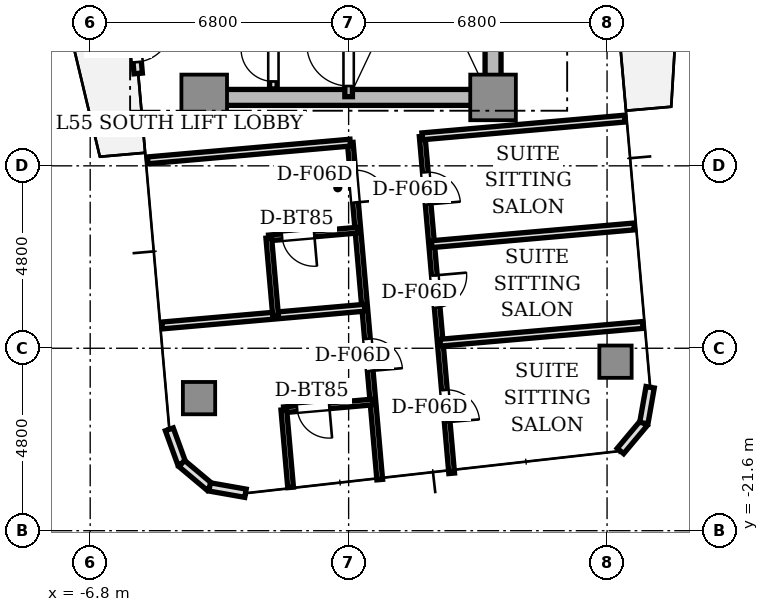
"""IFC4 building model, lengths in metres.
Left out: names, types, materials, properties, quantities, classifications, styles, units other than length and angle.
Written with IfcOpenShell. Run it as: python <this file> out.ifc"""

import sys

from ifc_helpers import new_model, si_unit, direction, frame, frame_2d, origin, origin_2d, place, context, subcontext, project, spatial, rectangle, extrude, source, transform, mapped, element, fill, save


model = new_model("IFC4")
c1 = context("Model", 3, precision=1e-05, world=origin(), true_north=direction((0.0, 1.0)))
c2 = subcontext(c1, "Body", "Model", "MODEL_VIEW")
j1 = project(units=[si_unit("LENGTHUNIT", "METRE"), si_unit("PLANEANGLEUNIT", "RADIAN")], contexts=[c1])
p1 = place(None, origin())
s1 = spatial("IfcSite", under=j1, at=p1, CompositionType="ELEMENT")
p2 = place(p1, origin())
s2 = spatial("IfcBuilding", under=s1, at=p2, CompositionType="ELEMENT")
p3 = place(p2, frame((0.0, 0.0, 198.65)))
s3 = spatial("IfcBuildingStorey", under=s2, at=p3, CompositionType="ELEMENT", Elevation=198.65)
p4 = place(p3, frame((-3.55, -10.2, 0.0), z_axis=(0.0, 0.0, 1.0), x_axis=(1.0, 0.0, 0.0)))
e1 = element("IfcWall", 1, at=p4, inside=s3, PredefinedType="SHEAR", context=c2, shape_type="SweptSolid", body=[
    extrude(rectangle(XDim=7.1, YDim=0.42, at=frame_2d((3.55, 0.0))), origin(), (0.0, 0.0, 1.0), 3.03),
])
p5 = place(p3, frame((3.8, -9.75, 0.0), z_axis=(0.0, 0.0, 1.0), x_axis=(0.0, 1.0, 0.0)))
e2 = element("IfcWall", 2, at=p5, inside=s3, PredefinedType="SHEAR", context=c2, shape_type="SweptSolid", body=[
    extrude(rectangle(XDim=6.9, YDim=0.42, at=frame_2d((3.45, 0.0))), origin(), (0.0, 0.0, 1.0), 3.03),
])
m1 = source(origin(), c2, "Body", "SweptSolid", [
    extrude(rectangle(XDim=1.2, YDim=1.2, at=origin_2d()), origin(), (0.0, 0.0, 1.0), 3.03),
])
for number, where, z_axis, x_axis in (
    (3, (-3.8, -10.2, 0.0), (0.0, 0.0, 1.0), (1.0, 0.0, 0.0)),
    (4, (3.8, -10.2, 0.0), (0.0, 0.0, 1.0), (1.0, 0.0, 0.0)),
):
    element("IfcColumn", number, at=place(p3, frame(where, z_axis=z_axis, x_axis=x_axis)), inside=s3, PredefinedType="COLUMN", context=c2, shape_type="MappedRepresentation", body=[
        mapped(m1, transform((0.0, 0.0, 0.0), scale=1.0)),
    ])
m2 = source(origin(), c2, "Body", "SweptSolid", [
    extrude(rectangle(XDim=0.85, YDim=0.85, at=origin_2d()), origin(), (0.0, 0.0, 1.0), 3.03),
])
for number, where, z_axis, x_axis in (
    (5, (-3.936, -18.112, 0.0), (0.0, 0.0, 1.0), (1.0, 0.0, 0.0)),
    (6, (7.022, -17.153, 0.0), (0.0, 0.0, 1.0), (1.0, 0.0, 0.0)),
):
    element("IfcColumn", number, at=place(p3, frame(where, z_axis=z_axis, x_axis=x_axis)), inside=s3, PredefinedType="COLUMN", context=c2, shape_type="MappedRepresentation", body=[
        mapped(m2, transform((0.0, 0.0, 0.0), scale=1.0)),
    ])
p6 = place(p3, frame((-5.772, -6.879, 0.0), z_axis=(0.0, 0.0, 1.0), x_axis=(0.087168071984, -0.996193619346, 0.0)))
e7 = element("IfcWall", 7, at=p6, inside=s3, PredefinedType="STANDARD", context=c2, shape_type="SweptSolid", body=[
    extrude(rectangle(XDim=2.7, YDim=0.22, at=frame_2d((1.35, 0.0))), origin(), (0.0, 0.0, 1.0), 3.03),
])
p7 = place(p6, frame((1.4, 0.0, 0.0)))
e8 = element("IfcOpeningElement", 8, at=p7, cuts=e7, PredefinedType="OPENING", context=c2, shape_type="SweptSolid", body=[
    extrude(rectangle(XDim=1.0, YDim=2.2, at=frame_2d((0.5, 1.1))), frame((0.0, 0.12, 0.0), z_axis=(0.0, -1.0, 0.0), x_axis=(1.0, 0.0, 0.0)), (0.0, 0.0, 1.0), 0.24),
])
p8 = place(p3, frame((-4.718, -18.933, 0.0), z_axis=(0.0, 0.0, 1.0), x_axis=(0.34188635151, -0.939741306239, 0.0)))
e9 = element("IfcWall", 9, at=p8, inside=s3, PredefinedType="STANDARD", context=c2, shape_type="SweptSolid", body=[
    extrude(rectangle(XDim=0.958, YDim=0.22, at=frame_2d((0.479, 0.0))), origin(), (0.0, 0.0, 1.0), 3.03),
])
for number, where, z_axis, x_axis in (
    (10, (-4.39, -19.833, 0.0), (0.0, 0.0, 1.0), (0.766, -0.643, 0.0)),
    (11, (-3.657, -20.449, 0.0), (0.0, 0.0, 1.0), (0.985, -0.174, 0.0)),
):
    element("IfcWall", number, at=place(p3, frame(where, z_axis=z_axis, x_axis=x_axis)), inside=s3, PredefinedType="STANDARD", context=c2, shape_type="SweptSolid", body=[
        extrude(rectangle(XDim=0.958, YDim=0.22, at=frame_2d((0.479, 0.0))), origin(), (0.0, 0.0, 1.0), 3.03),
    ])
for number, where, z_axis, x_axis in (
    (12, (7.152, -19.503, 0.0), (0.0, 0.0, 1.0), (0.643, 0.766, 0.0)),
    (13, (7.768, -18.769, 0.0), (0.0, 0.0, 1.0), (0.174, 0.985, 0.0)),
):
    element("IfcWall", number, at=place(p3, frame(where, z_axis=z_axis, x_axis=x_axis)), inside=s3, PredefinedType="STANDARD", context=c2, shape_type="SweptSolid", body=[
        extrude(rectangle(XDim=0.958, YDim=0.22, at=frame_2d((0.479, 0.0))), origin(), (0.0, 0.0, 1.0), 3.03),
    ])
p9 = place(p3, frame((0.0, -10.18, 0.0), z_axis=(0.0, 0.0, 1.0), x_axis=(0.0, 1.0, 0.0)))
e14 = element("IfcWall", 14, at=p9, inside=s3, PredefinedType="SOLIDWALL", context=c2, shape_type="SweptSolid", body=[
    extrude(rectangle(XDim=7.68, YDim=0.2, at=frame_2d((3.84, 0.0))), origin(), (0.0, 0.0, 1.0), 3.03),
])
p10 = place(p9, frame((0.28, 0.0, 0.0)))
e15 = element("IfcOpeningElement", 15, at=p10, cuts=e14, PredefinedType="OPENING", context=c2, shape_type="SweptSolid", body=[
    extrude(rectangle(XDim=1.1, YDim=2.15, at=frame_2d((0.55, 1.075))), frame((0.0, 0.11, 0.0), z_axis=(0.0, -1.0, 0.0), x_axis=(1.0, 0.0, 0.0)), (0.0, 0.0, 1.0), 0.22),
])
p11 = place(p3, frame((-1.98, -9.98, 0.0), z_axis=(0.0, 0.0, 1.0), x_axis=(0.0, 1.0, 0.0)))
e16 = element("IfcWall", 16, at=p11, inside=s3, PredefinedType="SOLIDWALL", context=c2, shape_type="SweptSolid", body=[
    extrude(rectangle(XDim=4.66, YDim=0.2, at=frame_2d((2.33, 0.0))), origin(), (0.0, 0.0, 1.0), 2.58),
])
p12 = place(p11, frame((0.2, 0.0, 0.0)))
e17 = element("IfcOpeningElement", 17, at=p12, cuts=e16, PredefinedType="OPENING", context=c2, shape_type="SweptSolid", body=[
    extrude(rectangle(XDim=0.85, YDim=2.1, at=frame_2d((0.425, 1.05))), frame((0.0, 0.11, 0.0), z_axis=(0.0, -1.0, 0.0), x_axis=(1.0, 0.0, 0.0)), (0.0, 0.0, 1.0), 0.22),
])
p13 = place(p3, frame((1.936, -11.224, 0.0), z_axis=(0.0, 0.0, 1.0), x_axis=(0.087151636982, -0.996195057291, 0.0)))
e18 = element("IfcWall", 18, at=p13, inside=s3, PredefinedType="PARTITIONING", context=c2, shape_type="SweptSolid", body=[
    extrude(rectangle(XDim=8.9, YDim=0.15, at=frame_2d((4.45, 0.0))), origin(), (0.0, 0.0, 1.0), 2.58),
])
p14 = place(p13, frame((0.949, 0.0, 0.0)))
e19 = element("IfcOpeningElement", 19, at=p14, cuts=e18, PredefinedType="OPENING", context=c2, shape_type="SweptSolid", body=[
    extrude(rectangle(XDim=0.85, YDim=2.1, at=frame_2d((0.425, 1.05))), frame((0.0, 0.085, 0.0), z_axis=(0.0, -1.0, 0.0), x_axis=(1.0, 0.0, 0.0)), (0.0, 0.0, 1.0), 0.17),
])
p15 = place(p13, frame((3.674, 0.0, 0.0)))
e20 = element("IfcOpeningElement", 20, at=p15, cuts=e18, PredefinedType="OPENING", context=c2, shape_type="SweptSolid", body=[
    extrude(rectangle(XDim=0.85, YDim=2.1, at=frame_2d((0.425, 1.05))), frame((0.0, 0.085, 0.0), z_axis=(0.0, -1.0, 0.0), x_axis=(1.0, 0.0, 0.0)), (0.0, 0.0, 1.0), 0.17),
])
p16 = place(p13, frame((6.7, 0.0, 0.0)))
e21 = element("IfcOpeningElement", 21, at=p16, cuts=e18, PredefinedType="OPENING", context=c2, shape_type="SweptSolid", body=[
    extrude(rectangle(XDim=0.85, YDim=2.1, at=frame_2d((0.425, 1.05))), frame((0.0, 0.085, 0.0), z_axis=(0.0, -1.0, 0.0), x_axis=(1.0, 0.0, 0.0)), (0.0, 0.0, 1.0), 0.17),
])
p17 = place(p3, frame((0.043, -11.39, 0.0), z_axis=(0.0, 0.0, 1.0), x_axis=(0.087178860582, -0.996192675273, 0.0)))
e22 = element("IfcWall", 22, at=p17, inside=s3, PredefinedType="PARTITIONING", context=c2, shape_type="SweptSolid", body=[
    extrude(rectangle(XDim=8.9, YDim=0.15, at=frame_2d((4.45, 0.0))), origin(), (0.0, 0.0, 1.0), 2.58),
])
p18 = place(p17, frame((0.73, 0.0, 0.0)))
e23 = element("IfcOpeningElement", 23, at=p18, cuts=e22, PredefinedType="OPENING", context=c2, shape_type="SweptSolid", body=[
    extrude(rectangle(XDim=0.85, YDim=2.1, at=frame_2d((0.425, 1.05))), frame((0.0, 0.085, 0.0), z_axis=(0.0, -1.0, 0.0), x_axis=(1.0, 0.0, 0.0)), (0.0, 0.0, 1.0), 0.17),
])
p19 = place(p17, frame((5.181, 0.0, 0.0)))
e24 = element("IfcOpeningElement", 24, at=p19, cuts=e22, PredefinedType="OPENING", context=c2, shape_type="SweptSolid", body=[
    extrude(rectangle(XDim=0.85, YDim=2.1, at=frame_2d((0.425, 1.05))), frame((0.0, 0.085, 0.0), z_axis=(0.0, -1.0, 0.0), x_axis=(1.0, 0.0, 0.0)), (0.0, 0.0, 1.0), 0.17),
])
for number, where, z_axis, x_axis in (
    (25, (1.936, -11.224, 0.0), (0.0, 0.0, 1.0), (0.996, 0.087, 0.0)),
    (26, (-5.287, -11.856, 0.0), (0.0, 0.0, 1.0), (0.996, 0.087, 0.0)),
    (27, (2.184, -14.061, 0.0), (0.0, 0.0, 1.0), (0.996, 0.087, 0.0)),
    (28, (2.411, -16.653, 0.0), (0.0, 0.0, 1.0), (0.996, 0.087, 0.0)),
    (29, (0.423, -15.734, 0.0), (0.0, 0.0, 1.0), (-0.996, -0.087, 0.0)),
):
    element("IfcWall", number, at=place(p3, frame(where, z_axis=z_axis, x_axis=x_axis)), inside=s3, PredefinedType="PARTITIONING", context=c2, shape_type="SweptSolid", body=[
        extrude(rectangle(XDim=5.35, YDim=0.18, at=frame_2d((2.675, 0.0))), origin(), (0.0, 0.0, 1.0), 2.58),
    ])
p20 = place(p3, frame((0.244, -13.692, 0.0), z_axis=(0.0, 0.0, 1.0), x_axis=(-0.996197656711, -0.087121918963, 0.0)))
e30 = element("IfcWall", 30, at=p20, inside=s3, PredefinedType="PARTITIONING", context=c2, shape_type="SweptSolid", body=[
    extrude(rectangle(XDim=2.354, YDim=0.15, at=frame_2d((1.177, 0.0))), origin(), (0.0, 0.0, 1.0), 2.58),
])
p21 = place(p20, frame((1.154, 0.0, 0.0)))
e31 = element("IfcOpeningElement", 31, at=p21, cuts=e30, PredefinedType="OPENING", context=c2, shape_type="SweptSolid", body=[
    extrude(rectangle(XDim=0.85, YDim=2.1, at=frame_2d((0.425, 1.05))), frame((0.0, 0.085, 0.0), z_axis=(0.0, -1.0, 0.0), x_axis=(1.0, 0.0, 0.0)), (0.0, 0.0, 1.0), 0.17),
])
p22 = place(p3, frame((-2.101, -13.897, 0.0), z_axis=(0.0, 0.0, 1.0), x_axis=(0.087174336889, -0.99619307114, 0.0)))
e32 = element("IfcWall", 32, at=p22, inside=s3, PredefinedType="PARTITIONING", context=c2, shape_type="SweptSolid", body=[
    extrude(rectangle(XDim=2.05, YDim=0.15, at=frame_2d((1.025, 0.0))), origin(), (0.0, 0.0, 1.0), 2.58),
])
p23 = place(p3, frame((0.64, -18.213, 0.0), z_axis=(0.0, 0.0, 1.0), x_axis=(-0.996188649846, -0.087224846905, 0.0)))
e33 = element("IfcWall", 33, at=p23, inside=s3, PredefinedType="PARTITIONING", context=c2, shape_type="SweptSolid", body=[
    extrude(rectangle(XDim=2.354, YDim=0.15, at=frame_2d((1.177, 0.0))), origin(), (0.0, 0.0, 1.0), 2.58),
])
p24 = place(p23, frame((1.154, 0.0, 0.0)))
e34 = element("IfcOpeningElement", 34, at=p24, cuts=e33, PredefinedType="OPENING", context=c2, shape_type="SweptSolid", body=[
    extrude(rectangle(XDim=0.85, YDim=2.1, at=frame_2d((0.425, 1.05))), frame((0.0, 0.085, 0.0), z_axis=(0.0, -1.0, 0.0), x_axis=(1.0, 0.0, 0.0)), (0.0, 0.0, 1.0), 0.17),
])
p25 = place(p3, frame((-1.705, -18.419, 0.0), z_axis=(0.0, 0.0, 1.0), x_axis=(0.087056149438, -0.996203406361, 0.0)))
e35 = element("IfcWall", 35, at=p25, inside=s3, PredefinedType="PARTITIONING", context=c2, shape_type="SweptSolid", body=[
    extrude(rectangle(XDim=2.05, YDim=0.15, at=frame_2d((1.025, 0.0))), origin(), (0.0, 0.0, 1.0), 2.58),
])
m3 = source(origin(), c2, "Body", "SweptSolid", [
    extrude(rectangle(XDim=1.0, YDim=0.05, at=origin_2d()), origin(), (0.0, 0.0, 1.0), 2.2),
])
p26 = place(p7, frame((0.5, 0.0, 0.0)))
e36 = element("IfcDoor", 36, at=p26, inside=s3, OperationType="SINGLE_SWING_LEFT", PredefinedType="DOOR", context=c2, shape_type="MappedRepresentation", body=[
    mapped(m3, transform((0.0, 0.0, 0.0), scale=1.0)),
])
fill(e8, e36)
m4 = source(origin(), c2, "Body", "SweptSolid", [
    extrude(rectangle(XDim=1.1, YDim=0.05, at=origin_2d()), origin(), (0.0, 0.0, 1.0), 2.15),
])
p27 = place(p10, frame((0.55, 0.0, 0.0)))
e37 = element("IfcDoor", 37, at=p27, inside=s3, OperationType="SINGLE_SWING_RIGHT", PredefinedType="DOOR", context=c2, shape_type="MappedRepresentation", body=[
    mapped(m4, transform((0.0, 0.0, 0.0), scale=1.0)),
])
fill(e15, e37)
m5 = source(origin(), c2, "Body", "SweptSolid", [
    extrude(rectangle(XDim=0.85, YDim=0.05, at=origin_2d()), origin(), (0.0, 0.0, 1.0), 2.1),
])
p28 = place(p12, frame((0.425, 0.0, 0.0)))
e38 = element("IfcDoor", 38, at=p28, inside=s3, OperationType="SINGLE_SWING_RIGHT", PredefinedType="DOOR", context=c2, shape_type="MappedRepresentation", body=[
    mapped(m5, transform((0.0, 0.0, 0.0), scale=1.0)),
])
fill(e17, e38)
p29 = place(p14, frame((0.425, 0.0, 0.0)))
e39 = element("IfcDoor", 39, at=p29, inside=s3, OperationType="SINGLE_SWING_RIGHT", PredefinedType="DOOR", context=c2, shape_type="MappedRepresentation", body=[
    mapped(m5, transform((0.0, 0.0, 0.0), scale=1.0)),
])
fill(e19, e39)
p30 = place(p15, frame((0.425, 0.0, 0.0)))
e40 = element("IfcDoor", 40, at=p30, inside=s3, OperationType="SINGLE_SWING_LEFT", PredefinedType="DOOR", context=c2, shape_type="MappedRepresentation", body=[
    mapped(m5, transform((0.0, 0.0, 0.0), scale=1.0)),
])
fill(e20, e40)
p31 = place(p16, frame((0.425, 0.0, 0.0)))
e41 = element("IfcDoor", 41, at=p31, inside=s3, OperationType="SINGLE_SWING_RIGHT", PredefinedType="DOOR", context=c2, shape_type="MappedRepresentation", body=[
    mapped(m5, transform((0.0, 0.0, 0.0), scale=1.0)),
])
fill(e21, e41)
p32 = place(p21, frame((0.425, 0.0, 0.0)))
e42 = element("IfcDoor", 42, at=p32, inside=s3, OperationType="SINGLE_SWING_LEFT", PredefinedType="DOOR", context=c2, shape_type="MappedRepresentation", body=[
    mapped(m5, transform((0.0, 0.0, 0.0), scale=1.0)),
])
fill(e31, e42)
p33 = place(p18, frame((0.425, 0.0, 0.0)))
e43 = element("IfcDoor", 43, at=p33, inside=s3, OperationType="SINGLE_SWING_RIGHT", PredefinedType="DOOR", context=c2, shape_type="MappedRepresentation", body=[
    mapped(m5, transform((0.0, 0.0, 0.0), scale=1.0)),
])
fill(e23, e43)
p34 = place(p24, frame((0.425, 0.0, 0.0)))
e44 = element("IfcDoor", 44, at=p34, inside=s3, OperationType="SINGLE_SWING_LEFT", PredefinedType="DOOR", context=c2, shape_type="MappedRepresentation", body=[
    mapped(m5, transform((0.0, 0.0, 0.0), scale=1.0)),
])
fill(e34, e44)
p35 = place(p19, frame((0.425, 0.0, 0.0)))
e45 = element("IfcDoor", 45, at=p35, inside=s3, OperationType="SINGLE_SWING_RIGHT", PredefinedType="DOOR", context=c2, shape_type="MappedRepresentation", body=[
    mapped(m5, transform((0.0, 0.0, 0.0), scale=1.0)),
])
fill(e24, e45)
save(model, sys.argv[1])
